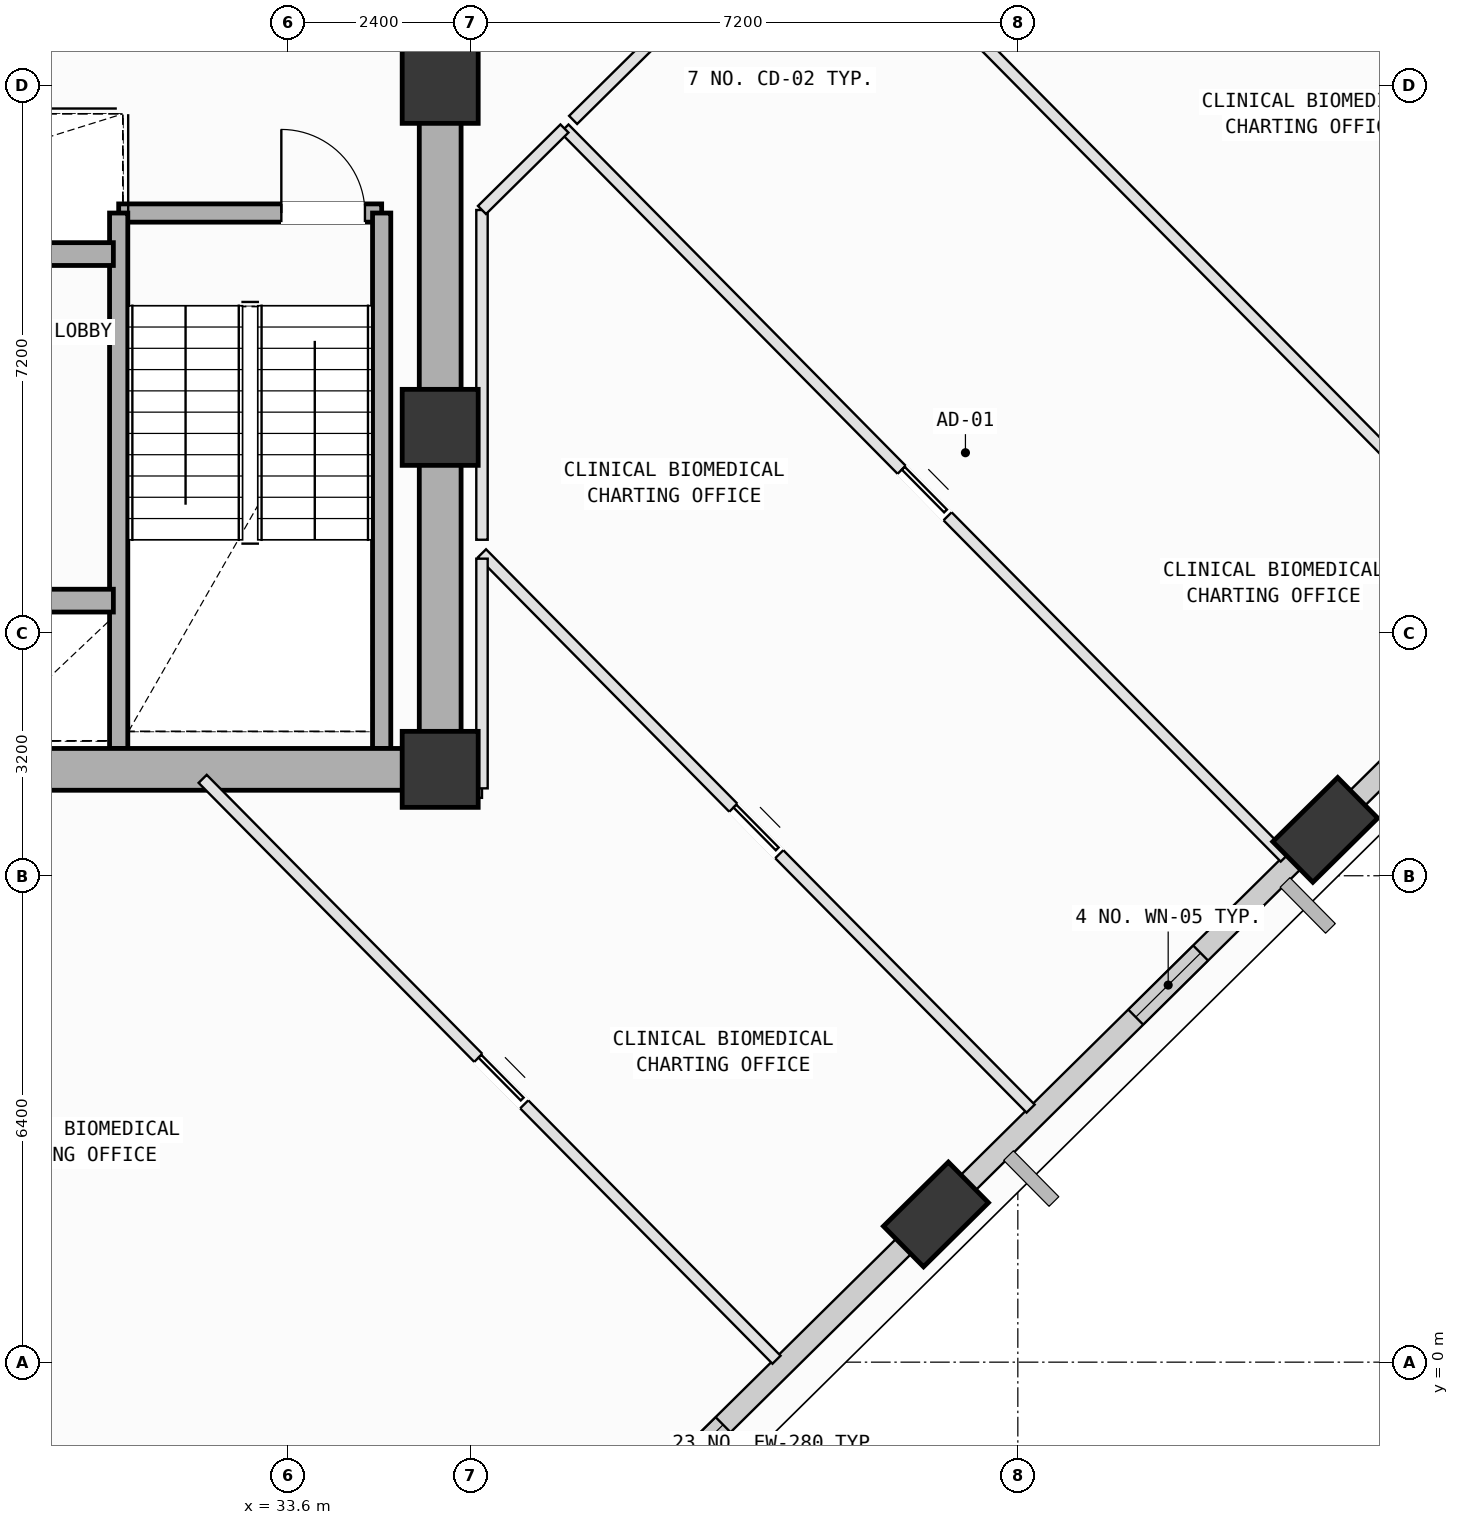
"""IFC4 building model, lengths in metres.
Left out: names, types, materials, properties, quantities, classifications, styles, units other than length and angle.
Written with IfcOpenShell. Run it as: python <this file> out.ifc"""

import sys

from ifc_helpers import new_model, si_unit, direction, frame, frame_2d, origin, origin_2d, place, context, subcontext, project, spatial, rectangle, extrude, element, fill, save


model = new_model("IFC4")
c1 = context("Model", 3, precision=1e-05, world=origin(), true_north=direction((0.0, 1.0)))
c2 = subcontext(c1, "Body", "Model", "MODEL_VIEW")
j1 = project(units=[si_unit("LENGTHUNIT", "METRE"), si_unit("PLANEANGLEUNIT", "RADIAN")], contexts=[c1])
p1 = place(None, origin())
s1 = spatial("IfcSite", under=j1, at=p1, CompositionType="ELEMENT")
p2 = place(p1, origin())
s2 = spatial("IfcBuilding", under=s1, at=p2, CompositionType="ELEMENT")
p3 = place(p2, frame((0.0, 0.0, 215.2)))
s3 = spatial("IfcBuildingStorey", under=s2, at=p3, CompositionType="ELEMENT", Elevation=215.2)
for number, where, z_axis, x_axis in (
    (1, (35.6, 7.8, 0.0), (0.0, 0.0, 1.0), (1.0, 0.0, 0.0)),
    (2, (35.6, 12.3, 0.0), (0.0, 0.0, 1.0), (1.0, 0.0, 0.0)),
    (3, (35.6, 16.8, 0.0), (0.0, 0.0, 1.0), (1.0, 0.0, 0.0)),
):
    element("IfcColumn", number, at=place(p3, frame(where, z_axis=z_axis, x_axis=x_axis)), inside=s3, PredefinedType="COLUMN", context=c2, shape_type="SweptSolid", body=[
        extrude(rectangle(XDim=1.0, YDim=1.0, at=origin_2d()), origin(), (0.0, 0.0, 1.0), 4.0),
    ])
p4 = place(p3, frame((42.123, 1.943, 0.002), z_axis=(0.093967690131, 0.035921671971, 0.99492698561), x_axis=(-0.907142120506, 0.414843158757, 0.07069884608)))
e4 = element("IfcColumn", 4, at=p4, inside=s3, PredefinedType="COLUMN", context=c2, shape_type="SweptSolid", body=[
    extrude(rectangle(XDim=1.2, YDim=0.75, at=origin_2d()), origin(), (0.0, 0.0, 1.0), 4.017),
])
p5 = place(p3, frame((47.245, 7.003, 0.002), z_axis=(0.072994502566, 0.056935712002, 0.995705843758), x_axis=(-0.989301110701, 0.130578425032, 0.065058337529)))
e5 = element("IfcColumn", 5, at=p5, inside=s3, PredefinedType="COLUMN", context=c2, shape_type="SweptSolid", body=[
    extrude(rectangle(XDim=1.2, YDim=0.75, at=origin_2d()), origin(), (0.0, 0.0, 1.0), 4.014),
])
p6 = place(p3, frame((41.978, 1.8, 0.0), z_axis=(0.0, 0.0, 1.0), x_axis=(-0.711397255374, -0.702790114506, 0.0)))
e6 = element("IfcWall", 6, at=p6, inside=s3, PredefinedType="SOLIDWALL", context=c2, shape_type="SweptSolid", body=[
    extrude(rectangle(XDim=6.439, YDim=0.28, at=frame_2d((3.219, 0.0))), origin(), (0.0, 0.0, 1.0), 3.265),
])
p7 = place(p6, frame((3.733, 0.0, 0.75)))
e7 = element("IfcOpeningElement", 7, at=p7, cuts=e6, PredefinedType="OPENING", context=c2, shape_type="SweptSolid", body=[
    extrude(rectangle(XDim=1.8, YDim=2.05, at=frame_2d((0.9, 1.025))), frame((0.0, 0.15, 0.0), z_axis=(0.0, -1.0, 0.0), x_axis=(1.0, 0.0, 0.0)), (0.0, 0.0, 1.0), 0.3),
])
p8 = place(p3, frame((47.094, 6.854, 0.0), z_axis=(0.0, 0.0, 1.0), x_axis=(-0.711433096034, -0.702753833051, 0.0)))
e8 = element("IfcWall", 8, at=p8, inside=s3, PredefinedType="SOLIDWALL", context=c2, shape_type="SweptSolid", body=[
    extrude(rectangle(XDim=6.414, YDim=0.28, at=frame_2d((3.207, 0.0))), origin(), (0.0, 0.0, 1.0), 3.265),
])
p9 = place(p8, frame((2.093, 0.0, 0.75)))
e9 = element("IfcOpeningElement", 9, at=p9, cuts=e8, PredefinedType="OPENING", context=c2, shape_type="SweptSolid", body=[
    extrude(rectangle(XDim=1.2, YDim=1.75, at=frame_2d((0.6, 0.875))), frame((0.0, 0.15, 0.0), z_axis=(0.0, -1.0, 0.0), x_axis=(1.0, 0.0, 0.0)), (0.0, 0.0, 1.0), 0.3),
])
p10 = place(p3, frame((52.216, 11.915, 0.0), z_axis=(0.0, 0.0, 1.0), x_axis=(-0.711418692423, -0.702768414252, 0.0)))
e10 = element("IfcWall", 10, at=p10, inside=s3, PredefinedType="SOLIDWALL", context=c2, shape_type="SweptSolid", body=[
    extrude(rectangle(XDim=6.407, YDim=0.28, at=frame_2d((3.203, 0.0))), origin(), (0.0, 0.0, 1.0), 3.265),
])
p11 = place(p10, frame((3.97, 0.0, 0.75)))
e11 = element("IfcOpeningElement", 11, at=p11, cuts=e10, PredefinedType="OPENING", context=c2, shape_type="SweptSolid", body=[
    extrude(rectangle(XDim=1.6, YDim=1.95, at=frame_2d((0.8, 0.975))), frame((0.0, 0.15, 0.0), z_axis=(0.0, -1.0, 0.0), x_axis=(1.0, 0.0, 0.0)), (0.0, 0.0, 1.0), 0.3),
])
p12 = place(p3, frame((31.37, 15.12, 0.0), z_axis=(0.0, 0.0, 1.0), x_axis=(1.0, 0.0, 0.0)))
e12 = element("IfcWall", 12, at=p12, inside=s3, PredefinedType="SOLIDWALL", context=c2, shape_type="SweptSolid", body=[
    extrude(rectangle(XDim=3.46, YDim=0.24, at=frame_2d((1.73, 0.0))), origin(), (0.0, 0.0, 1.0), 3.78),
])
p13 = place(p12, frame((2.14, 0.0, 0.0)))
e13 = element("IfcOpeningElement", 13, at=p13, cuts=e12, PredefinedType="OPENING", context=c2, shape_type="SweptSolid", body=[
    extrude(rectangle(XDim=1.1, YDim=2.15, at=frame_2d((0.55, 1.075))), frame((0.0, 0.13, 0.0), z_axis=(0.0, -1.0, 0.0), x_axis=(1.0, 0.0, 0.0)), (0.0, 0.0, 1.0), 0.26),
])
for number, where, z_axis, x_axis in (
    (14, (34.83, 15.12, 0.0), (0.0, 0.0, 1.0), (0.0, -1.0, 0.0)),
    (15, (31.37, 8.075, 0.0), (0.0, 0.0, 1.0), (0.0, 1.0, 0.0)),
):
    element("IfcWall", number, at=place(p3, frame(where, z_axis=z_axis, x_axis=x_axis)), inside=s3, PredefinedType="SOLIDWALL", context=c2, shape_type="SweptSolid", body=[
        extrude(rectangle(XDim=7.045, YDim=0.24, at=frame_2d((3.522, 0.0))), origin(), (0.0, 0.0, 1.0), 3.78),
    ])
p14 = place(p3, frame((24.8, 7.8, 0.0), z_axis=(0.0, 0.0, 1.0), x_axis=(1.0, 0.0, 0.0)))
e16 = element("IfcWall", 16, at=p14, inside=s3, PredefinedType="SHEAR", context=c2, shape_type="SweptSolid", body=[
    extrude(rectangle(XDim=10.8, YDim=0.55, at=frame_2d((5.4, 0.0))), origin(), (0.0, 0.0, 1.0), 3.78),
])
p15 = place(p3, frame((35.6, 7.8, 0.0), z_axis=(0.0, 0.0, 1.0), x_axis=(0.0, 1.0, 0.0)))
e17 = element("IfcWall", 17, at=p15, inside=s3, PredefinedType="SHEAR", context=c2, shape_type="SweptSolid", body=[
    extrude(rectangle(XDim=9.0, YDim=0.55, at=frame_2d((4.5, 0.0))), origin(), (0.0, 0.0, 1.0), 3.78),
])
p16 = place(p3, frame((29.6, 10.02, 0.0), z_axis=(0.0, 0.0, 1.0), x_axis=(1.0, 0.0, 0.0)))
e18 = element("IfcWall", 18, at=p16, inside=s3, PredefinedType="SOLIDWALL", context=c2, shape_type="SweptSolid", body=[
    extrude(rectangle(XDim=1.7, YDim=0.3, at=frame_2d((0.85, 0.0))), origin(), (0.0, 0.0, 1.0), 3.78),
])
p17 = place(p3, frame((25.85, 14.58, 0.0), z_axis=(0.0, 0.0, 1.0), x_axis=(1.0, 0.0, 0.0)))
e19 = element("IfcWall", 19, at=p17, inside=s3, PredefinedType="SOLIDWALL", context=c2, shape_type="SweptSolid", body=[
    extrude(rectangle(XDim=5.45, YDim=0.3, at=frame_2d((2.725, 0.0))), origin(), (0.0, 0.0, 1.0), 3.78),
])
p18 = place(p17, frame((0.34, 0.0, 0.0)))
e20 = element("IfcOpeningElement", 20, at=p18, cuts=e19, PredefinedType="OPENING", context=c2, shape_type="SweptSolid", body=[
    extrude(rectangle(XDim=1.12, YDim=2.15, at=frame_2d((0.56, 1.075))), frame((0.0, 0.16, 0.0), z_axis=(0.0, -1.0, 0.0), x_axis=(1.0, 0.0, 0.0)), (0.0, 0.0, 1.0), 0.32),
])
p19 = place(p17, frame((2.24, 0.0, 0.0)))
e21 = element("IfcOpeningElement", 21, at=p19, cuts=e19, PredefinedType="OPENING", context=c2, shape_type="SweptSolid", body=[
    extrude(rectangle(XDim=1.12, YDim=2.15, at=frame_2d((0.56, 1.075))), frame((0.0, 0.16, 0.0), z_axis=(0.0, -1.0, 0.0), x_axis=(1.0, 0.0, 0.0)), (0.0, 0.0, 1.0), 0.32),
])
p20 = place(p3, frame((33.452, -6.461, 0.0), z_axis=(0.0, 0.0, 1.0), x_axis=(-0.702748437793, 0.711438425431, 0.0)))
e22 = element("IfcWall", 22, at=p20, inside=s3, PredefinedType="PARTITIONING", context=c2, shape_type="SweptSolid", body=[
    extrude(rectangle(XDim=13.485, YDim=0.15, at=frame_2d((6.743, 0.0))), origin(), (0.0, 0.0, 1.0), 3.78),
])
p21 = place(p3, frame((32.475, 7.675, 0.0), z_axis=(0.0, 0.0, 1.0), x_axis=(0.702752952964, -0.711433965383, 0.0)))
e23 = element("IfcWall", 23, at=p21, inside=s3, PredefinedType="PARTITIONING", context=c2, shape_type="SweptSolid", body=[
    extrude(rectangle(XDim=10.743, YDim=0.15, at=frame_2d((5.372, 0.0))), origin(), (0.0, 0.0, 1.0), 3.78),
])
p22 = place(p21, frame((5.16, 0.0, 0.0)))
e24 = element("IfcOpeningElement", 24, at=p22, cuts=e23, PredefinedType="OPENING", context=c2, shape_type="SweptSolid", body=[
    extrude(rectangle(XDim=0.86, YDim=2.06, at=frame_2d((0.43, 1.03))), frame((0.0, 0.085, 0.0), z_axis=(0.0, -1.0, 0.0), x_axis=(1.0, 0.0, 0.0)), (0.0, 0.0, 1.0), 0.17),
])
p23 = place(p3, frame((36.15, 10.643, 0.0), z_axis=(0.0, 0.0, 1.0), x_axis=(0.702755477797, -0.71143147135, 0.0)))
e25 = element("IfcWall", 25, at=p23, inside=s3, PredefinedType="PARTITIONING", context=c2, shape_type="SweptSolid", body=[
    extrude(rectangle(XDim=10.271, YDim=0.15, at=frame_2d((5.135, 0.0))), origin(), (0.0, 0.0, 1.0), 3.78),
])
p24 = place(p23, frame((4.706, 0.0, 0.0)))
e26 = element("IfcOpeningElement", 26, at=p24, cuts=e25, PredefinedType="OPENING", context=c2, shape_type="SweptSolid", body=[
    extrude(rectangle(XDim=0.86, YDim=2.06, at=frame_2d((0.43, 1.03))), frame((0.0, 0.085, 0.0), z_axis=(0.0, -1.0, 0.0), x_axis=(1.0, 0.0, 0.0)), (0.0, 0.0, 1.0), 0.17),
])
p25 = place(p3, frame((42.693, 2.183, 0.0), z_axis=(0.0, 0.0, 1.0), x_axis=(-0.711637874268, -0.702546465301, 0.0)))
e27 = element("IfcWall", 27, at=p25, inside=s3, PredefinedType="PARTITIONING", context=c2, shape_type="SweptSolid", body=[
    extrude(rectangle(XDim=0.779, YDim=0.15, at=frame_2d((0.389, 0.0))), origin(), (0.0, 0.0, 1.0), 3.265),
])
p26 = place(p3, frame((35.6, 7.5, 0.0), z_axis=(0.0, 0.0, 1.0), x_axis=(1.0, 0.0, 0.0)))
e28 = element("IfcWall", 28, at=p26, inside=s3, PredefinedType="PARTITIONING", context=c2, shape_type="SweptSolid", body=[
    extrude(rectangle(XDim=0.55, YDim=0.15, at=frame_2d((0.275, 0.0))), origin(), (0.0, 0.0, 1.0), 3.78),
])
p27 = place(p3, frame((36.15, 7.55, 0.0), z_axis=(0.0, 0.0, 1.0), x_axis=(0.0, 1.0, 0.0)))
e29 = element("IfcWall", 29, at=p27, inside=s3, PredefinedType="PARTITIONING", context=c2, shape_type="SweptSolid", body=[
    extrude(rectangle(XDim=3.022, YDim=0.15, at=frame_2d((1.511, 0.0))), origin(), (0.0, 0.0, 1.0), 3.78),
])
p28 = place(p3, frame((37.235, 16.232, 0.0), z_axis=(0.0, 0.0, 1.0), x_axis=(0.702784644296, -0.711402659358, 0.0)))
e30 = element("IfcWall", 30, at=p28, inside=s3, PredefinedType="PARTITIONING", context=c2, shape_type="SweptSolid", body=[
    extrude(rectangle(XDim=13.485, YDim=0.15, at=frame_2d((6.742, 0.0))), origin(), (0.0, 0.0, 1.0), 3.78),
])
p29 = place(p28, frame((6.312, 0.0, 0.0)))
e31 = element("IfcOpeningElement", 31, at=p29, cuts=e30, PredefinedType="OPENING", context=c2, shape_type="SweptSolid", body=[
    extrude(rectangle(XDim=0.86, YDim=2.06, at=frame_2d((0.43, 1.03))), frame((0.0, 0.085, 0.0), z_axis=(0.0, -1.0, 0.0), x_axis=(1.0, 0.0, 0.0)), (0.0, 0.0, 1.0), 0.17),
])
p30 = place(p3, frame((36.15, 10.821, 0.0), z_axis=(0.0, 0.0, 1.0), x_axis=(0.0, 1.0, 0.0)))
e32 = element("IfcWall", 32, at=p30, inside=s3, PredefinedType="PARTITIONING", context=c2, shape_type="SweptSolid", body=[
    extrude(rectangle(XDim=4.339, YDim=0.15, at=frame_2d((2.169, 0.0))), origin(), (0.0, 0.0, 1.0), 3.78),
])
p31 = place(p3, frame((36.15, 15.16, 0.0), z_axis=(0.0, 0.0, 1.0), x_axis=(0.711414882023, 0.702772271533, 0.0)))
e33 = element("IfcWall", 33, at=p31, inside=s3, PredefinedType="PARTITIONING", context=c2, shape_type="SweptSolid", body=[
    extrude(rectangle(XDim=1.525, YDim=0.15, at=frame_2d((0.763, 0.0))), origin(), (0.0, 0.0, 1.0), 3.78),
])
p32 = place(p3, frame((41.23, 18.876, 0.0), z_axis=(0.0, 0.0, 1.0), x_axis=(0.702748277784, -0.711438583485, 0.0)))
e34 = element("IfcWall", 34, at=p32, inside=s3, PredefinedType="PARTITIONING", context=c2, shape_type="SweptSolid", body=[
    extrude(rectangle(XDim=12.558, YDim=0.15, at=frame_2d((6.279, 0.0))), origin(), (0.0, 0.0, 1.0), 3.78),
])
p33 = place(p3, frame((47.82, 7.249, 0.0), z_axis=(0.0, 0.0, 1.0), x_axis=(-0.711549525488, -0.702635946119, 0.0)))
e35 = element("IfcWall", 35, at=p33, inside=s3, PredefinedType="PARTITIONING", context=c2, shape_type="SweptSolid", body=[
    extrude(rectangle(XDim=0.794, YDim=0.15, at=frame_2d((0.397, 0.0))), origin(), (0.0, 0.0, 1.0), 3.265),
])
p34 = place(p3, frame((37.349, 16.345, 0.0), z_axis=(0.0, 0.0, 1.0), x_axis=(0.711558299302, 0.70262706089, 0.0)))
e36 = element("IfcWall", 36, at=p34, inside=s3, PredefinedType="PARTITIONING", context=c2, shape_type="SweptSolid", body=[
    extrude(rectangle(XDim=2.241, YDim=0.15, at=frame_2d((1.121, 0.0))), origin(), (0.0, 0.0, 1.0), 3.78),
])
p35 = place(p3, frame((43.923, 22.838, 0.0), z_axis=(0.0, 0.0, 1.0), x_axis=(0.702757042413, -0.711429925811, 0.0)))
e37 = element("IfcWall", 37, at=p35, inside=s3, PredefinedType="PARTITIONING", context=c2, shape_type="SweptSolid", body=[
    extrude(rectangle(XDim=13.484, YDim=0.15, at=frame_2d((6.742, 0.0))), origin(), (0.0, 0.0, 1.0), 3.415),
])
p36 = place(p3, frame((47.266, 26.141, 0.0), z_axis=(0.0, 0.0, 1.0), x_axis=(0.702821292956, -0.711366452799, 0.0)))
e38 = element("IfcWall", 38, at=p36, inside=s3, PredefinedType="PARTITIONING", context=c2, shape_type="SweptSolid", body=[
    extrude(rectangle(XDim=13.485, YDim=0.15, at=frame_2d((6.743, 0.0))), origin(), (0.0, 0.0, 1.0), 3.78),
])
p37 = place(p7, origin())
e39 = element("IfcWindow", 39, at=p37, inside=s3, PartitioningType="SINGLE_PANEL", PredefinedType="WINDOW", context=c2, shape_type="SweptSolid", body=[
    extrude(rectangle(XDim=1.8, YDim=2.05, at=frame_2d((0.9, 1.025))), frame((0.0, 0.03, 0.0), z_axis=(0.0, -1.0, 0.0), x_axis=(1.0, 0.0, 0.0)), (0.0, 0.0, 1.0), 0.06),
])
fill(e7, e39)
p38 = place(p9, origin())
e40 = element("IfcWindow", 40, at=p38, inside=s3, PartitioningType="SINGLE_PANEL", PredefinedType="WINDOW", context=c2, shape_type="SweptSolid", body=[
    extrude(rectangle(XDim=1.2, YDim=1.75, at=frame_2d((0.6, 0.875))), frame((0.0, 0.03, 0.0), z_axis=(0.0, -1.0, 0.0), x_axis=(1.0, 0.0, 0.0)), (0.0, 0.0, 1.0), 0.06),
])
fill(e9, e40)
p39 = place(p13, origin())
e41 = element("IfcDoor", 41, at=p39, inside=s3, OperationType="SINGLE_SWING_LEFT", PredefinedType="DOOR", context=c2, shape_type="SweptSolid", body=[
    extrude(rectangle(XDim=1.1, YDim=2.15, at=frame_2d((0.55, 1.075))), frame((0.0, 0.025, 0.0), z_axis=(0.0, -1.0, 0.0), x_axis=(1.0, 0.0, 0.0)), (0.0, 0.0, 1.0), 0.05),
])
fill(e13, e41)
p40 = place(p29, origin())
e42 = element("IfcDoor", 42, at=p40, inside=s3, OperationType="SLIDING_TO_LEFT", PredefinedType="DOOR", context=c2, shape_type="SweptSolid", body=[
    extrude(rectangle(XDim=0.86, YDim=2.06, at=frame_2d((0.43, 1.03))), frame((0.0, 0.025, 0.0), z_axis=(0.0, -1.0, 0.0), x_axis=(1.0, 0.0, 0.0)), (0.0, 0.0, 1.0), 0.05),
])
fill(e31, e42)
p41 = place(p24, origin())
e43 = element("IfcDoor", 43, at=p41, inside=s3, OperationType="SLIDING_TO_LEFT", PredefinedType="DOOR", context=c2, shape_type="SweptSolid", body=[
    extrude(rectangle(XDim=0.86, YDim=2.06, at=frame_2d((0.43, 1.03))), frame((0.0, 0.025, 0.0), z_axis=(0.0, -1.0, 0.0), x_axis=(1.0, 0.0, 0.0)), (0.0, 0.0, 1.0), 0.05),
])
fill(e26, e43)
p42 = place(p22, origin())
e44 = element("IfcDoor", 44, at=p42, inside=s3, OperationType="SLIDING_TO_LEFT", PredefinedType="DOOR", context=c2, shape_type="SweptSolid", body=[
    extrude(rectangle(XDim=0.86, YDim=2.06, at=frame_2d((0.43, 1.03))), frame((0.0, 0.025, 0.0), z_axis=(0.0, -1.0, 0.0), x_axis=(1.0, 0.0, 0.0)), (0.0, 0.0, 1.0), 0.05),
])
fill(e24, e44)
save(model, sys.argv[1])
